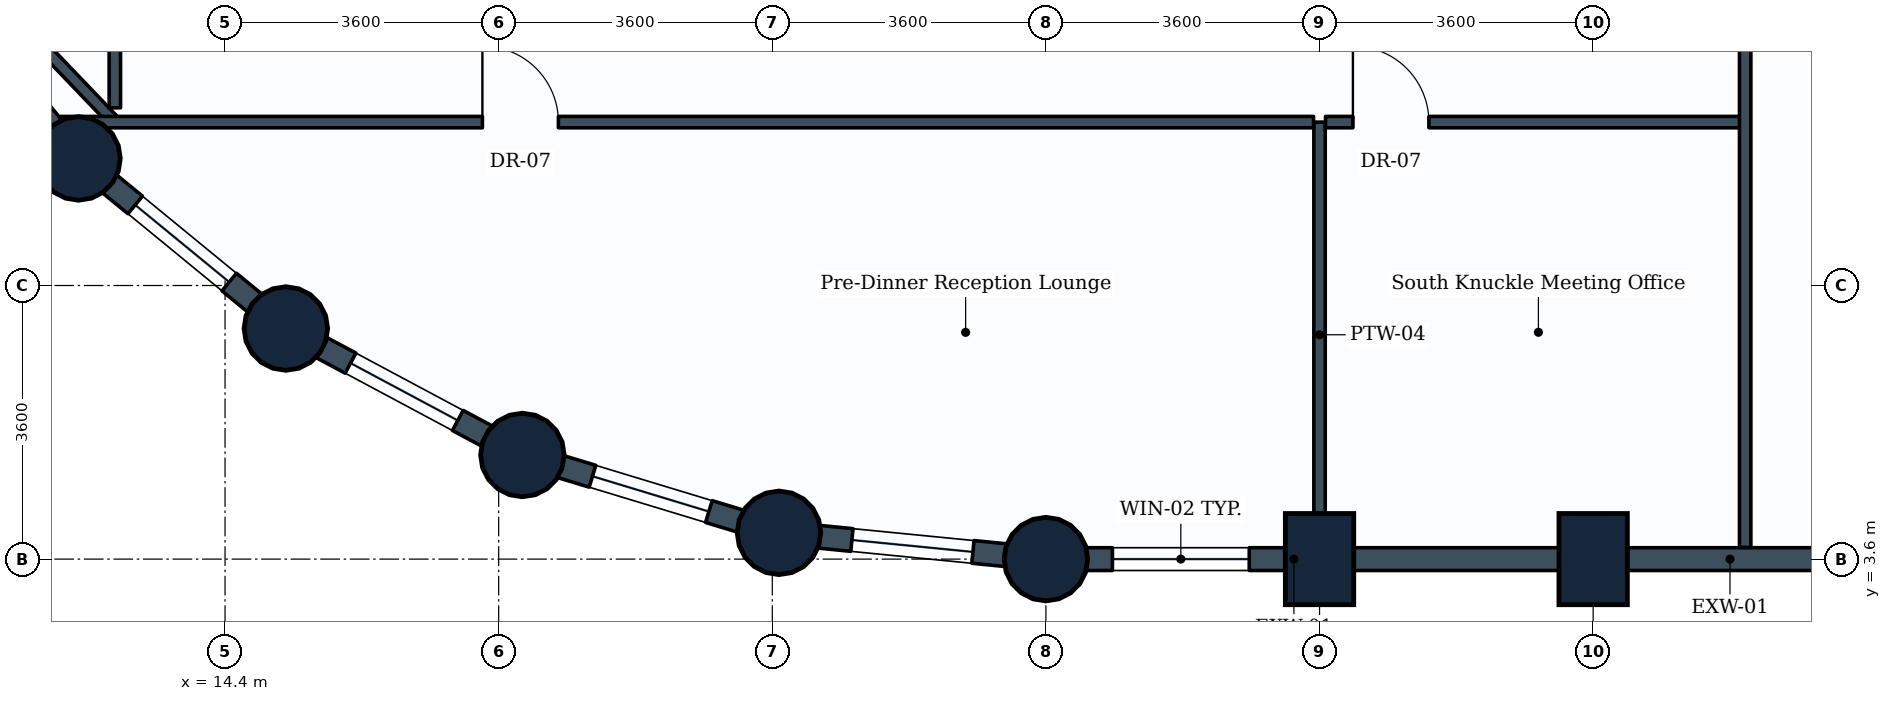
"""IFC4 building model, lengths in metres.
Left out: names, types, materials, properties, quantities, classifications, styles, units other than length and angle.
Written with IfcOpenShell. Run it as: python <this file> out.ifc"""

import sys

from ifc_helpers import new_model, si_unit, direction, frame, frame_2d, origin, origin_2d, place, context, subcontext, project, spatial, rectangle, circle, extrude, element, fill, save


model = new_model("IFC4")
c1 = context("Model", 3, precision=1e-05, world=origin(), true_north=direction((0.0, 1.0)))
c2 = subcontext(c1, "Body", "Model", "MODEL_VIEW")
j1 = project(units=[si_unit("LENGTHUNIT", "METRE"), si_unit("PLANEANGLEUNIT", "RADIAN")], contexts=[c1])
p1 = place(None, origin())
s1 = spatial("IfcSite", under=j1, at=p1, CompositionType="ELEMENT")
p2 = place(p1, origin())
s2 = spatial("IfcBuilding", under=s1, at=p2, CompositionType="ELEMENT")
p3 = place(p2, frame((0.0, 0.0, 70.8)))
s3 = spatial("IfcBuildingStorey", under=s2, at=p3, CompositionType="ELEMENT", Elevation=70.8)
for number, where, z_axis, x_axis in (
    (1, (12.472, 8.872, 0.0), (0.0, 0.0, 1.0), (1.0, 0.0, 0.0)),
    (2, (15.2, 6.634, 0.0), (0.0, 0.0, 1.0), (1.0, 0.0, 0.0)),
    (3, (18.312, 4.97, 0.0), (0.0, 0.0, 1.0), (1.0, 0.0, 0.0)),
    (4, (21.688, 3.946, 0.0), (0.0, 0.0, 1.0), (1.0, 0.0, 0.0)),
    (5, (25.2, 3.6, 0.0), (0.0, 0.0, 1.0), (1.0, 0.0, 0.0)),
):
    element("IfcColumn", number, at=place(p3, frame(where, z_axis=z_axis, x_axis=x_axis)), inside=s3, PredefinedType="COLUMN", context=c2, shape_type="SweptSolid", body=[
        extrude(circle(Radius=0.55, at=origin_2d()), origin(), (0.0, 0.0, 1.0), 3.9),
    ])
for number, where, z_axis, x_axis in (
    (6, (28.8, 3.6, 0.0), (0.0, 0.0, 1.0), (1.0, 0.0, 0.0)),
    (7, (32.4, 3.6, 0.0), (0.0, 0.0, 1.0), (1.0, 0.0, 0.0)),
):
    element("IfcColumn", number, at=place(p3, frame(where, z_axis=z_axis, x_axis=x_axis)), inside=s3, PredefinedType="COLUMN", context=c2, shape_type="SweptSolid", body=[
        extrude(rectangle(XDim=0.9, YDim=1.2, at=origin_2d()), origin(), (0.0, 0.0, 1.0), 3.9),
    ])
p4 = place(p3, frame((28.8, 3.6, 0.0), z_axis=(0.0, 0.0, 1.0), x_axis=(-1.0, 0.0, 0.0)))
e8 = element("IfcWall", 8, at=p4, inside=s3, PredefinedType="STANDARD", context=c2, shape_type="SweptSolid", body=[
    extrude(rectangle(XDim=3.6, YDim=0.3, at=frame_2d((1.8, 0.0))), origin(), (0.0, 0.0, 1.0), 2.93),
])
p5 = place(p4, frame((0.925, 0.0, 0.85)))
e9 = element("IfcOpeningElement", 9, at=p5, cuts=e8, PredefinedType="OPENING", context=c2, shape_type="SweptSolid", body=[
    extrude(rectangle(XDim=1.8, YDim=1.35, at=frame_2d((0.9, 0.675))), frame((0.0, 0.16, 0.0), z_axis=(0.0, -1.0, 0.0), x_axis=(1.0, 0.0, 0.0)), (0.0, 0.0, 1.0), 0.32),
])
p6 = place(p3, frame((32.4, 3.6, 0.0), z_axis=(0.0, 0.0, 1.0), x_axis=(-1.0, 0.0, 0.0)))
e10 = element("IfcWall", 10, at=p6, inside=s3, PredefinedType="STANDARD", context=c2, shape_type="SweptSolid", body=[
    extrude(rectangle(XDim=3.6, YDim=0.3, at=frame_2d((1.8, 0.0))), origin(), (0.0, 0.0, 1.0), 2.93),
])
p7 = place(p3, frame((36.0, 3.6, 0.0), z_axis=(0.0, 0.0, 1.0), x_axis=(-1.0, 0.0, 0.0)))
e11 = element("IfcWall", 11, at=p7, inside=s3, PredefinedType="STANDARD", context=c2, shape_type="SweptSolid", body=[
    extrude(rectangle(XDim=3.6, YDim=0.3, at=frame_2d((1.8, 0.0))), origin(), (0.0, 0.0, 1.0), 2.93),
])
p8 = place(p3, frame((12.472, 8.872, 0.0), z_axis=(0.0, 0.0, 1.0), x_axis=(-0.634258295121, 0.773121216285, 0.0)))
e12 = element("IfcWall", 12, at=p8, inside=s3, PredefinedType="STANDARD", context=c2, shape_type="SweptSolid", body=[
    extrude(rectangle(XDim=3.529, YDim=0.3, at=frame_2d((1.764, 0.0))), origin(), (0.0, 0.0, 1.0), 2.93),
])
p9 = place(p8, frame((0.964, 0.0, 0.85)))
e13 = element("IfcOpeningElement", 13, at=p9, cuts=e12, PredefinedType="OPENING", context=c2, shape_type="SweptSolid", body=[
    extrude(rectangle(XDim=1.6, YDim=1.35, at=frame_2d((0.8, 0.675))), frame((0.0, 0.16, 0.0), z_axis=(0.0, -1.0, 0.0), x_axis=(1.0, 0.0, 0.0)), (0.0, 0.0, 1.0), 0.32),
])
p10 = place(p3, frame((15.2, 6.634, 0.0), z_axis=(0.0, 0.0, 1.0), x_axis=(-0.773121216285, 0.634258295121, 0.0)))
e14 = element("IfcWall", 14, at=p10, inside=s3, PredefinedType="STANDARD", context=c2, shape_type="SweptSolid", body=[
    extrude(rectangle(XDim=3.529, YDim=0.3, at=frame_2d((1.764, 0.0))), origin(), (0.0, 0.0, 1.0), 2.93),
])
p11 = place(p10, frame((0.964, 0.0, 0.85)))
e15 = element("IfcOpeningElement", 15, at=p11, cuts=e14, PredefinedType="OPENING", context=c2, shape_type="SweptSolid", body=[
    extrude(rectangle(XDim=1.6, YDim=1.35, at=frame_2d((0.8, 0.675))), frame((0.0, 0.16, 0.0), z_axis=(0.0, -1.0, 0.0), x_axis=(1.0, 0.0, 0.0)), (0.0, 0.0, 1.0), 0.32),
])
p12 = place(p3, frame((18.312, 4.97, 0.0), z_axis=(0.0, 0.0, 1.0), x_axis=(-0.881846862014, 0.471535907389, 0.0)))
e16 = element("IfcWall", 16, at=p12, inside=s3, PredefinedType="STANDARD", context=c2, shape_type="SweptSolid", body=[
    extrude(rectangle(XDim=3.529, YDim=0.3, at=frame_2d((1.765, 0.0))), origin(), (0.0, 0.0, 1.0), 2.93),
])
p13 = place(p12, frame((0.964, 0.0, 0.85)))
e17 = element("IfcOpeningElement", 17, at=p13, cuts=e16, PredefinedType="OPENING", context=c2, shape_type="SweptSolid", body=[
    extrude(rectangle(XDim=1.6, YDim=1.35, at=frame_2d((0.8, 0.675))), frame((0.0, 0.16, 0.0), z_axis=(0.0, -1.0, 0.0), x_axis=(1.0, 0.0, 0.0)), (0.0, 0.0, 1.0), 0.32),
])
p14 = place(p3, frame((21.688, 3.946, 0.0), z_axis=(0.0, 0.0, 1.0), x_axis=(-0.956953367403, 0.290241714123, 0.0)))
e18 = element("IfcWall", 18, at=p14, inside=s3, PredefinedType="STANDARD", context=c2, shape_type="SweptSolid", body=[
    extrude(rectangle(XDim=3.528, YDim=0.3, at=frame_2d((1.764, 0.0))), origin(), (0.0, 0.0, 1.0), 2.93),
])
p15 = place(p14, frame((0.964, 0.0, 0.85)))
e19 = element("IfcOpeningElement", 19, at=p15, cuts=e18, PredefinedType="OPENING", context=c2, shape_type="SweptSolid", body=[
    extrude(rectangle(XDim=1.6, YDim=1.35, at=frame_2d((0.8, 0.675))), frame((0.0, 0.16, 0.0), z_axis=(0.0, -1.0, 0.0), x_axis=(1.0, 0.0, 0.0)), (0.0, 0.0, 1.0), 0.32),
])
p16 = place(p3, frame((25.2, 3.6, 0.0), z_axis=(0.0, 0.0, 1.0), x_axis=(-0.995183369056, 0.098030923459, 0.0)))
e20 = element("IfcWall", 20, at=p16, inside=s3, PredefinedType="STANDARD", context=c2, shape_type="SweptSolid", body=[
    extrude(rectangle(XDim=3.529, YDim=0.3, at=frame_2d((1.765, 0.0))), origin(), (0.0, 0.0, 1.0), 2.93),
])
p17 = place(p16, frame((0.965, 0.0, 0.85)))
e21 = element("IfcOpeningElement", 21, at=p17, cuts=e20, PredefinedType="OPENING", context=c2, shape_type="SweptSolid", body=[
    extrude(rectangle(XDim=1.6, YDim=1.35, at=frame_2d((0.8, 0.675))), frame((0.0, 0.16, 0.0), z_axis=(0.0, -1.0, 0.0), x_axis=(1.0, 0.0, 0.0)), (0.0, 0.0, 1.0), 0.32),
])
p18 = place(p3, frame((28.8, 9.35, 0.0), z_axis=(0.0, 0.0, 1.0), x_axis=(0.0, -1.0, 0.0)))
e22 = element("IfcWall", 22, at=p18, inside=s3, PredefinedType="PARTITIONING", context=c2, shape_type="SweptSolid", body=[
    extrude(rectangle(XDim=5.596, YDim=0.15, at=frame_2d((2.798, 0.0))), origin(), (0.0, 0.0, 1.0), 3.565),
])
p19 = place(p3, frame((12.95, 9.35, 0.0), z_axis=(0.0, 0.0, 1.0), x_axis=(-0.692039701287, 0.721859440503, 0.0)))
e23 = element("IfcWall", 23, at=p19, inside=s3, PredefinedType="PARTITIONING", context=c2, shape_type="SweptSolid", body=[
    extrude(rectangle(XDim=4.184, YDim=0.15, at=frame_2d((2.092, 0.0))), origin(), (0.0, 0.0, 1.0), 2.93),
])
p20 = place(p3, frame((12.95, 9.538, 0.0), z_axis=(0.0, 0.0, 1.0), x_axis=(0.0, 1.0, 0.0)))
e24 = element("IfcWall", 24, at=p20, inside=s3, PredefinedType="PARTITIONING", context=c2, shape_type="SweptSolid", body=[
    extrude(rectangle(XDim=6.983, YDim=0.15, at=frame_2d((3.492, 0.0))), origin(), (0.0, 0.0, 1.0), 2.97),
])
p21 = place(p20, frame((4.043, 0.0, 0.0)))
e25 = element("IfcOpeningElement", 25, at=p21, cuts=e24, PredefinedType="OPENING", context=c2, shape_type="SweptSolid", body=[
    extrude(rectangle(XDim=1.0, YDim=2.1, at=frame_2d((0.5, 1.05))), frame((0.0, 0.085, 0.0), z_axis=(0.0, -1.0, 0.0), x_axis=(1.0, 0.0, 0.0)), (0.0, 0.0, 1.0), 0.17),
])
p22 = place(p3, frame((12.234, 9.35, 0.0), z_axis=(0.0, 0.0, 1.0), x_axis=(1.0, 0.0, 0.0)))
e26 = element("IfcWall", 26, at=p22, inside=s3, PredefinedType="PARTITIONING", context=c2, shape_type="SweptSolid", body=[
    extrude(rectangle(XDim=16.487, YDim=0.15, at=frame_2d((8.244, 0.0))), origin(), (0.0, 0.0, 1.0), 2.93),
])
p23 = place(p22, frame((5.552, 0.0, 0.0)))
e27 = element("IfcOpeningElement", 27, at=p23, cuts=e26, PredefinedType="OPENING", context=c2, shape_type="SweptSolid", body=[
    extrude(rectangle(XDim=1.0, YDim=2.1, at=frame_2d((0.5, 1.05))), frame((0.0, 0.085, 0.0), z_axis=(0.0, -1.0, 0.0), x_axis=(1.0, 0.0, 0.0)), (0.0, 0.0, 1.0), 0.17),
])
p24 = place(p3, frame((28.879, 9.35, 0.0), z_axis=(0.0, 0.0, 1.0), x_axis=(1.0, 0.0, 0.0)))
e28 = element("IfcWall", 28, at=p24, inside=s3, PredefinedType="PARTITIONING", context=c2, shape_type="SweptSolid", body=[
    extrude(rectangle(XDim=5.521, YDim=0.15, at=frame_2d((2.76, 0.0))), origin(), (0.0, 0.0, 1.0), 3.565),
])
p25 = place(p24, frame((0.36, 0.0, 0.0)))
e29 = element("IfcOpeningElement", 29, at=p25, cuts=e28, PredefinedType="OPENING", context=c2, shape_type="SweptSolid", body=[
    extrude(rectangle(XDim=1.0, YDim=2.1, at=frame_2d((0.5, 1.05))), frame((0.0, 0.085, 0.0), z_axis=(0.0, -1.0, 0.0), x_axis=(1.0, 0.0, 0.0)), (0.0, 0.0, 1.0), 0.17),
])
p26 = place(p3, frame((34.4, 3.754, 0.0), z_axis=(0.0, 0.0, 1.0), x_axis=(0.0, 1.0, 0.0)))
e30 = element("IfcWall", 30, at=p26, inside=s3, PredefinedType="PARTITIONING", context=c2, shape_type="SweptSolid", body=[
    extrude(rectangle(XDim=6.896, YDim=0.15, at=frame_2d((3.448, 0.0))), origin(), (0.0, 0.0, 1.0), 2.93),
])
p27 = place(p5, origin())
e31 = element("IfcWindow", 31, at=p27, inside=s3, PartitioningType="SINGLE_PANEL", PredefinedType="WINDOW", context=c2, shape_type="SweptSolid", body=[
    extrude(rectangle(XDim=1.8, YDim=1.35, at=frame_2d((0.9, 0.675))), frame((0.0, 0.03, 0.0), z_axis=(0.0, -1.0, 0.0), x_axis=(1.0, 0.0, 0.0)), (0.0, 0.0, 1.0), 0.06),
])
fill(e9, e31)
p28 = place(p11, origin())
e32 = element("IfcWindow", 32, at=p28, inside=s3, PartitioningType="SINGLE_PANEL", PredefinedType="WINDOW", context=c2, shape_type="SweptSolid", body=[
    extrude(rectangle(XDim=1.6, YDim=1.35, at=frame_2d((0.8, 0.675))), frame((0.0, 0.03, 0.0), z_axis=(0.0, -1.0, 0.0), x_axis=(1.0, 0.0, 0.0)), (0.0, 0.0, 1.0), 0.06),
])
fill(e15, e32)
p29 = place(p13, origin())
e33 = element("IfcWindow", 33, at=p29, inside=s3, PartitioningType="SINGLE_PANEL", PredefinedType="WINDOW", context=c2, shape_type="SweptSolid", body=[
    extrude(rectangle(XDim=1.6, YDim=1.35, at=frame_2d((0.8, 0.675))), frame((0.0, 0.03, 0.0), z_axis=(0.0, -1.0, 0.0), x_axis=(1.0, 0.0, 0.0)), (0.0, 0.0, 1.0), 0.06),
])
fill(e17, e33)
p30 = place(p15, origin())
e34 = element("IfcWindow", 34, at=p30, inside=s3, PartitioningType="SINGLE_PANEL", PredefinedType="WINDOW", context=c2, shape_type="SweptSolid", body=[
    extrude(rectangle(XDim=1.6, YDim=1.35, at=frame_2d((0.8, 0.675))), frame((0.0, 0.03, 0.0), z_axis=(0.0, -1.0, 0.0), x_axis=(1.0, 0.0, 0.0)), (0.0, 0.0, 1.0), 0.06),
])
fill(e19, e34)
p31 = place(p17, origin())
e35 = element("IfcWindow", 35, at=p31, inside=s3, PartitioningType="SINGLE_PANEL", PredefinedType="WINDOW", context=c2, shape_type="SweptSolid", body=[
    extrude(rectangle(XDim=1.6, YDim=1.35, at=frame_2d((0.8, 0.675))), frame((0.0, 0.03, 0.0), z_axis=(0.0, -1.0, 0.0), x_axis=(1.0, 0.0, 0.0)), (0.0, 0.0, 1.0), 0.06),
])
fill(e21, e35)
p32 = place(p23, origin())
e36 = element("IfcDoor", 36, at=p32, inside=s3, OperationType="SINGLE_SWING_LEFT", PredefinedType="DOOR", context=c2, shape_type="SweptSolid", body=[
    extrude(rectangle(XDim=1.0, YDim=2.1, at=frame_2d((0.5, 1.05))), frame((0.0, 0.025, 0.0), z_axis=(0.0, -1.0, 0.0), x_axis=(1.0, 0.0, 0.0)), (0.0, 0.0, 1.0), 0.05),
])
fill(e27, e36)
p33 = place(p25, origin())
e37 = element("IfcDoor", 37, at=p33, inside=s3, OperationType="SINGLE_SWING_LEFT", PredefinedType="DOOR", context=c2, shape_type="SweptSolid", body=[
    extrude(rectangle(XDim=1.0, YDim=2.1, at=frame_2d((0.5, 1.05))), frame((0.0, 0.025, 0.0), z_axis=(0.0, -1.0, 0.0), x_axis=(1.0, 0.0, 0.0)), (0.0, 0.0, 1.0), 0.05),
])
fill(e29, e37)
save(model, sys.argv[1])
